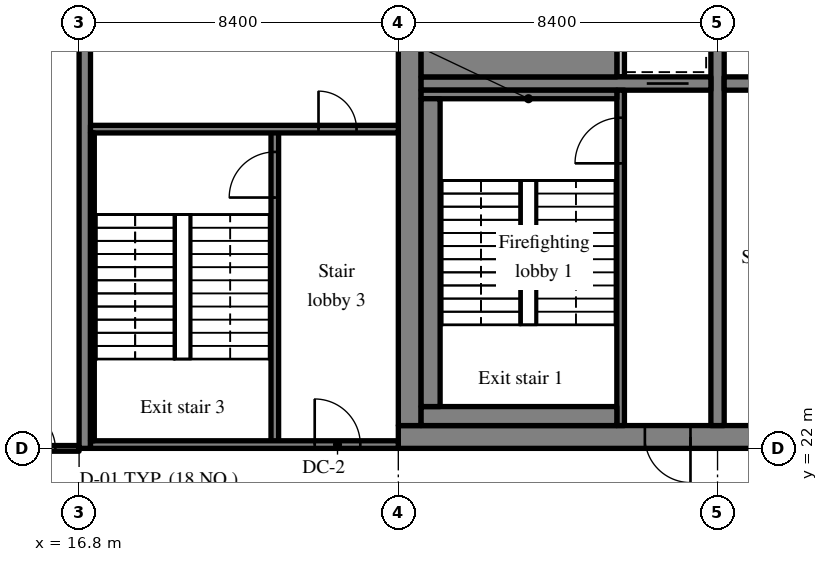
"""IFC4 building model, lengths in metres.
Left out: names, types, materials, properties, quantities, classifications, styles, units other than length and angle.
Written with IfcOpenShell. Run it as: python <this file> out.ifc"""

import sys

from ifc_helpers import new_model, si_unit, direction, frame, frame_2d, origin, place, context, subcontext, project, spatial, rectangle, extrude, source, transform, mapped, element, fill, save


model = new_model("IFC4")
c1 = context("Model", 3, precision=1e-05, world=origin(), true_north=direction((0.0, 1.0)))
c2 = subcontext(c1, "Body", "Model", "MODEL_VIEW")
j1 = project(units=[si_unit("LENGTHUNIT", "METRE"), si_unit("PLANEANGLEUNIT", "RADIAN")], contexts=[c1])
p1 = place(None, origin())
s1 = spatial("IfcSite", under=j1, at=p1, CompositionType="ELEMENT")
p2 = place(p1, origin())
s2 = spatial("IfcBuilding", under=s1, at=p2, CompositionType="ELEMENT")
p3 = place(p2, frame((0.0, 0.0, 241.3)))
s3 = spatial("IfcBuildingStorey", under=s2, at=p3, CompositionType="ELEMENT", Elevation=241.3)
m1 = source(origin(), c2, "Body", "SweptSolid", [
    extrude(rectangle(XDim=50.4, YDim=0.6, at=frame_2d((25.2, 0.0))), origin(), (0.0, 0.0, 1.0), 3.62),
])
p4 = place(p3, frame((25.2, 22.3, 0.0), z_axis=(0.0, 0.0, 1.0), x_axis=(1.0, 0.0, 0.0)))
e1 = element("IfcWall", 1, at=p4, inside=s3, PredefinedType="SHEAR", context=c2, shape_type="MappedRepresentation", body=[
    mapped(m1, transform((0.0, 0.0, 0.0), scale=1.0)),
])
m2 = source(origin(), c2, "Body", "SweptSolid", [
    extrude(rectangle(XDim=1.8, YDim=2.1, at=frame_2d((0.9, 1.05))), frame((0.0, 0.31, 0.0), z_axis=(0.0, -1.0, 0.0), x_axis=(1.0, 0.0, 0.0)), (0.0, 0.0, 1.0), 0.62),
])
p5 = place(p4, frame((15.9, 0.0, 0.0)))
e2 = element("IfcOpeningElement", 2, at=p5, cuts=e1, PredefinedType="OPENING", context=c2, shape_type="MappedRepresentation", body=[
    mapped(m2, transform((0.0, 0.0, 0.0), scale=1.0)),
])
m3 = source(origin(), c2, "Body", "SweptSolid", [
    extrude(rectangle(XDim=0.9, YDim=2.1, at=frame_2d((0.45, 1.05))), frame((0.0, 0.31, 0.0), z_axis=(0.0, -1.0, 0.0), x_axis=(1.0, 0.0, 0.0)), (0.0, 0.0, 1.0), 0.62),
])
p6 = place(p4, frame((9.687, 0.0, 0.0)))
e3 = element("IfcOpeningElement", 3, at=p6, cuts=e1, PredefinedType="OPENING", context=c2, shape_type="MappedRepresentation", body=[
    mapped(m3, transform((0.0, 0.0, 0.0), scale=1.0)),
])
p7 = place(p4, frame((21.513, 0.0, 0.0)))
e4 = element("IfcOpeningElement", 4, at=p7, cuts=e1, PredefinedType="OPENING", context=c2, shape_type="MappedRepresentation", body=[
    mapped(m3, transform((0.0, 0.0, 0.0), scale=1.0)),
])
p8 = place(p4, frame((32.7, 0.0, 0.0)))
e5 = element("IfcOpeningElement", 5, at=p8, cuts=e1, PredefinedType="OPENING", context=c2, shape_type="MappedRepresentation", body=[
    mapped(m2, transform((0.0, 0.0, 0.0), scale=1.0)),
])
m4 = source(origin(), c2, "Body", "SweptSolid", [
    extrude(rectangle(XDim=1.2, YDim=2.1, at=frame_2d((0.6, 1.05))), frame((0.0, 0.31, 0.0), z_axis=(0.0, -1.0, 0.0), x_axis=(1.0, 0.0, 0.0)), (0.0, 0.0, 1.0), 0.62),
])
p9 = place(p4, frame((6.488, 0.0, 0.0)))
e6 = element("IfcOpeningElement", 6, at=p9, cuts=e1, PredefinedType="OPENING", context=c2, shape_type="MappedRepresentation", body=[
    mapped(m4, transform((0.0, 0.0, 0.0), scale=1.0)),
])
p10 = place(p4, frame((47.925, 0.0, 0.0)))
e7 = element("IfcOpeningElement", 7, at=p10, cuts=e1, PredefinedType="OPENING", context=c2, shape_type="MappedRepresentation", body=[
    mapped(m4, transform((0.0, 0.0, 0.0), scale=1.0)),
])
m5 = source(origin(), c2, "Body", "SweptSolid", [
    extrude(rectangle(XDim=18.8, YDim=0.6, at=frame_2d((9.4, 0.0))), origin(), (0.0, 0.0, 1.0), 3.62),
])
p11 = place(p3, frame((25.5, 22.6, 0.0), z_axis=(0.0, 0.0, 1.0), x_axis=(0.0, 1.0, 0.0)))
e8 = element("IfcWall", 8, at=p11, inside=s3, PredefinedType="SHEAR", context=c2, shape_type="MappedRepresentation", body=[
    mapped(m5, transform((0.0, 0.0, 0.0), scale=1.0)),
])
m6 = source(origin(), c2, "Body", "SweptSolid", [
    extrude(rectangle(XDim=18.8, YDim=0.35, at=frame_2d((9.4, 0.0))), origin(), (0.0, 0.0, 1.0), 3.62),
])
p12 = place(p3, frame((33.6, 22.6, 0.0), z_axis=(0.0, 0.0, 1.0), x_axis=(0.0, 1.0, 0.0)))
e9 = element("IfcWall", 9, at=p12, inside=s3, PredefinedType="SHEAR", context=c2, shape_type="MappedRepresentation", body=[
    mapped(m6, transform((0.0, 0.0, 0.0), scale=1.0)),
])
m7 = source(origin(), c2, "Body", "SweptSolid", [
    extrude(rectangle(XDim=1.1, YDim=2.1, at=frame_2d((0.55, 1.05))), frame((0.0, 0.185, 0.0), z_axis=(0.0, -1.0, 0.0), x_axis=(1.0, 0.0, 0.0)), (0.0, 0.0, 1.0), 0.37),
])
p13 = place(p12, frame((12.85, 0.0, 0.0)))
e10 = element("IfcOpeningElement", 10, at=p13, cuts=e9, PredefinedType="OPENING", context=c2, shape_type="MappedRepresentation", body=[
    mapped(m7, transform((0.0, 0.0, 0.0), scale=1.0)),
])
m8 = source(origin(), c2, "Body", "SweptSolid", [
    extrude(rectangle(XDim=7.625, YDim=0.35, at=frame_2d((3.812, 0.0))), origin(), (0.0, 0.0, 1.0), 3.62),
])
p14 = place(p3, frame((25.8, 31.6, 0.0), z_axis=(0.0, 0.0, 1.0), x_axis=(1.0, 0.0, 0.0)))
e11 = element("IfcWall", 11, at=p14, inside=s3, PredefinedType="SHEAR", context=c2, shape_type="MappedRepresentation", body=[
    mapped(m8, transform((0.0, 0.0, 0.0), scale=1.0)),
])
p15 = place(p14, frame((5.938, 0.0, 0.0)))
e12 = element("IfcOpeningElement", 12, at=p15, cuts=e11, PredefinedType="OPENING", context=c2, shape_type="MappedRepresentation", body=[
    mapped(m7, transform((0.0, 0.0, 0.0), scale=1.0)),
])
m9 = source(origin(), c2, "Body", "SweptSolid", [
    extrude(rectangle(XDim=16.45, YDim=0.35, at=frame_2d((8.225, 0.0))), origin(), (0.0, 0.0, 1.0), 3.62),
])
p16 = place(p3, frame((33.775, 31.6, 0.0), z_axis=(0.0, 0.0, 1.0), x_axis=(1.0, 0.0, 0.0)))
e13 = element("IfcWall", 13, at=p16, inside=s3, PredefinedType="SHEAR", context=c2, shape_type="MappedRepresentation", body=[
    mapped(m9, transform((0.0, 0.0, 0.0), scale=1.0)),
])
m10 = source(origin(), c2, "Body", "SweptSolid", [
    extrude(rectangle(XDim=1.0, YDim=2.1, at=frame_2d((0.5, 1.05))), frame((0.0, 0.185, 0.0), z_axis=(0.0, -1.0, 0.0), x_axis=(1.0, 0.0, 0.0)), (0.0, 0.0, 1.0), 0.37),
])
p17 = place(p16, frame((14.837, 0.0, 0.0)))
e14 = element("IfcOpeningElement", 14, at=p17, cuts=e13, PredefinedType="OPENING", context=c2, shape_type="MappedRepresentation", body=[
    mapped(m10, transform((0.0, 0.0, 0.0), scale=1.0)),
])
m11 = source(origin(), c2, "Body", "SweptSolid", [
    extrude(rectangle(XDim=18.4, YDim=0.3, at=frame_2d((9.2, 0.0))), origin(), (0.0, 0.0, 1.0), 3.62),
])
p18 = place(p3, frame((16.95, 22.0, 0.0), z_axis=(0.0, 0.0, 1.0), x_axis=(0.0, 1.0, 0.0)))
e15 = element("IfcWall", 15, at=p18, inside=s3, PredefinedType="SHEAR", context=c2, shape_type="MappedRepresentation", body=[
    mapped(m11, transform((0.0, 0.0, 0.0), scale=1.0)),
])
m12 = source(origin(), c2, "Body", "SweptSolid", [
    extrude(rectangle(XDim=8.825, YDim=0.2, at=frame_2d((4.413, 0.0))), origin(), (0.0, 0.0, 1.0), 3.62),
])
p19 = place(p3, frame((31.05, 22.6, 0.0), z_axis=(0.0, 0.0, 1.0), x_axis=(0.0, 1.0, 0.0)))
e16 = element("IfcWall", 16, at=p19, inside=s3, PredefinedType="SOLIDWALL", context=c2, shape_type="MappedRepresentation", body=[
    mapped(m12, transform((0.0, 0.0, 0.0), scale=1.0)),
])
m13 = source(origin(), c2, "Body", "SweptSolid", [
    extrude(rectangle(XDim=1.2, YDim=2.1, at=frame_2d((0.6, 1.05))), frame((0.0, 0.11, 0.0), z_axis=(0.0, -1.0, 0.0), x_axis=(1.0, 0.0, 0.0)), (0.0, 0.0, 1.0), 0.22),
])
p20 = place(p19, frame((6.9, 0.0, 0.0)))
e17 = element("IfcOpeningElement", 17, at=p20, cuts=e16, PredefinedType="OPENING", context=c2, shape_type="MappedRepresentation", body=[
    mapped(m13, transform((0.0, 0.0, 0.0), scale=1.0)),
])
m14 = source(origin(), c2, "Body", "SweptSolid", [
    extrude(rectangle(XDim=1.825, YDim=0.2, at=frame_2d((0.913, 0.0))), origin(), (0.0, 0.0, 1.0), 3.62),
])
p21 = place(p3, frame((31.05, 31.775, 0.0), z_axis=(0.0, 0.0, 1.0), x_axis=(0.0, 1.0, 0.0)))
e18 = element("IfcWall", 18, at=p21, inside=s3, PredefinedType="SOLIDWALL", context=c2, shape_type="MappedRepresentation", body=[
    mapped(m14, transform((0.0, 0.0, 0.0), scale=1.0)),
])
m15 = source(origin(), c2, "Body", "SweptSolid", [
    extrude(rectangle(XDim=8.3, YDim=0.2, at=frame_2d((4.15, 0.0))), origin(), (0.0, 0.0, 1.0), 3.62),
])
p22 = place(p3, frame((21.95, 22.1, 0.0), z_axis=(0.0, 0.0, 1.0), x_axis=(0.0, 1.0, 0.0)))
e19 = element("IfcWall", 19, at=p22, inside=s3, PredefinedType="SOLIDWALL", context=c2, shape_type="MappedRepresentation", body=[
    mapped(m15, transform((0.0, 0.0, 0.0), scale=1.0)),
])
p23 = place(p22, frame((6.5, 0.0, 0.0)))
e20 = element("IfcOpeningElement", 20, at=p23, cuts=e19, PredefinedType="OPENING", context=c2, shape_type="MappedRepresentation", body=[
    mapped(m13, transform((0.0, 0.0, 0.0), scale=1.0)),
])
m16 = source(origin(), c2, "Body", "SweptSolid", [
    extrude(rectangle(XDim=8.1, YDim=0.2, at=frame_2d((4.05, 0.0))), origin(), (0.0, 0.0, 1.0), 3.62),
])
p24 = place(p3, frame((17.1, 22.1, 0.0), z_axis=(0.0, 0.0, 1.0), x_axis=(1.0, 0.0, 0.0)))
e21 = element("IfcWall", 21, at=p24, inside=s3, PredefinedType="SOLIDWALL", context=c2, shape_type="MappedRepresentation", body=[
    mapped(m16, transform((0.0, 0.0, 0.0), scale=1.0)),
])
p25 = place(p24, frame((5.9, 0.0, 0.0)))
e22 = element("IfcOpeningElement", 22, at=p25, cuts=e21, PredefinedType="OPENING", context=c2, shape_type="MappedRepresentation", body=[
    mapped(m13, transform((0.0, 0.0, 0.0), scale=1.0)),
])
p26 = place(p3, frame((17.1, 30.4, 0.0), z_axis=(0.0, 0.0, 1.0), x_axis=(1.0, 0.0, 0.0)))
e23 = element("IfcWall", 23, at=p26, inside=s3, PredefinedType="SOLIDWALL", context=c2, shape_type="MappedRepresentation", body=[
    mapped(m16, transform((0.0, 0.0, 0.0), scale=1.0)),
])
m17 = source(origin(), c2, "Body", "SweptSolid", [
    extrude(rectangle(XDim=1.0, YDim=2.1, at=frame_2d((0.5, 1.05))), frame((0.0, 0.11, 0.0), z_axis=(0.0, -1.0, 0.0), x_axis=(1.0, 0.0, 0.0)), (0.0, 0.0, 1.0), 0.22),
])
p27 = place(p26, frame((6.0, 0.0, 0.0)))
e24 = element("IfcOpeningElement", 24, at=p27, cuts=e23, PredefinedType="OPENING", context=c2, shape_type="MappedRepresentation", body=[
    mapped(m17, transform((0.0, 0.0, 0.0), scale=1.0)),
])
m18 = source(origin(), c2, "Body", "SweptSolid", [
    extrude(rectangle(XDim=5.15, YDim=0.5, at=frame_2d((2.575, 0.0))), origin(), (0.0, 0.0, 1.0), 3.62),
])
p28 = place(p3, frame((25.8, 22.85, 0.0), z_axis=(0.0, 0.0, 1.0), x_axis=(1.0, 0.0, 0.0)))
e25 = element("IfcWall", 25, at=p28, inside=s3, PredefinedType="SOLIDWALL", context=c2, shape_type="MappedRepresentation", body=[
    mapped(m18, transform((0.0, 0.0, 0.0), scale=1.0)),
])
m19 = source(origin(), c2, "Body", "SweptSolid", [
    extrude(rectangle(XDim=5.15, YDim=0.225, at=frame_2d((2.575, 0.0))), origin(), (0.0, 0.0, 1.0), 3.62),
])
p29 = place(p3, frame((25.8, 31.312, 0.0), z_axis=(0.0, 0.0, 1.0), x_axis=(1.0, 0.0, 0.0)))
e26 = element("IfcWall", 26, at=p29, inside=s3, PredefinedType="SOLIDWALL", context=c2, shape_type="MappedRepresentation", body=[
    mapped(m19, transform((0.0, 0.0, 0.0), scale=1.0)),
])
m20 = source(origin(), c2, "Body", "SweptSolid", [
    extrude(rectangle(XDim=8.1, YDim=0.5, at=frame_2d((4.05, 0.0))), origin(), (0.0, 0.0, 1.0), 3.62),
])
p30 = place(p3, frame((26.05, 23.1, 0.0), z_axis=(0.0, 0.0, 1.0), x_axis=(0.0, 1.0, 0.0)))
e27 = element("IfcWall", 27, at=p30, inside=s3, PredefinedType="SOLIDWALL", context=c2, shape_type="MappedRepresentation", body=[
    mapped(m20, transform((0.0, 0.0, 0.0), scale=1.0)),
])
m21 = source(origin(), c2, "Body", "SweptSolid", [
    extrude(rectangle(XDim=8.1, YDim=0.1, at=frame_2d((4.05, 0.0))), origin(), (0.0, 0.0, 1.0), 3.62),
])
p31 = place(p3, frame((17.15, 22.2, 0.0), z_axis=(0.0, 0.0, 1.0), x_axis=(0.0, 1.0, 0.0)))
e28 = element("IfcWall", 28, at=p31, inside=s3, PredefinedType="SOLIDWALL", context=c2, shape_type="MappedRepresentation", body=[
    mapped(m21, transform((0.0, 0.0, 0.0), scale=1.0)),
])
m22 = source(origin(), c2, "Body", "SweptSolid", [
    extrude(rectangle(XDim=5.15, YDim=1.025, at=frame_2d((2.575, 0.0))), origin(), (0.0, 0.0, 1.0), 3.62),
])
p32 = place(p3, frame((25.8, 32.287, 0.0), z_axis=(0.0, 0.0, 1.0), x_axis=(1.0, 0.0, 0.0)))
e29 = element("IfcWall", 29, at=p32, inside=s3, PredefinedType="SOLIDWALL", context=c2, shape_type="MappedRepresentation", body=[
    mapped(m22, transform((0.0, 0.0, 0.0), scale=1.0)),
])
m23 = source(origin(), c2, "Body", "SweptSolid", [
    extrude(rectangle(XDim=1.9, YDim=0.15, at=frame_2d((0.95, 0.0))), origin(), (0.0, 0.0, 1.0), 2.92),
])
p33 = place(p3, frame((14.9, 22.0, 0.0), z_axis=(0.0, 0.0, 1.0), x_axis=(1.0, 0.0, 0.0)))
e30 = element("IfcWall", 30, at=p33, inside=s3, PredefinedType="PARTITIONING", context=c2, shape_type="MappedRepresentation", body=[
    mapped(m23, transform((0.0, 0.0, 0.0), scale=1.0)),
])
m24 = source(origin(), c2, "Body", "SweptSolid", [
    extrude(rectangle(XDim=1.0, YDim=2.1, at=frame_2d((0.5, 1.05))), frame((0.0, 0.085, 0.0), z_axis=(0.0, -1.0, 0.0), x_axis=(1.0, 0.0, 0.0)), (0.0, 0.0, 1.0), 0.17),
])
p34 = place(p33, frame((0.275, 0.0, 0.0)))
e31 = element("IfcOpeningElement", 31, at=p34, cuts=e30, PredefinedType="OPENING", context=c2, shape_type="MappedRepresentation", body=[
    mapped(m24, transform((0.0, 0.0, 0.0), scale=1.0)),
])
m25 = source(origin(), c2, "Body", "SweptSolid", [
    extrude(rectangle(XDim=1.2, YDim=2.1, at=frame_2d((0.6, 1.05))), frame((0.0, 0.025, 0.0), z_axis=(0.0, -1.0, 0.0), x_axis=(1.0, 0.0, 0.0)), (0.0, 0.0, 1.0), 0.05),
])
p35 = place(p20, origin())
e32 = element("IfcDoor", 32, at=p35, inside=s3, OperationType="SINGLE_SWING_LEFT", PredefinedType="DOOR", context=c2, shape_type="MappedRepresentation", body=[
    mapped(m25, transform((0.0, 0.0, 0.0), scale=1.0)),
])
fill(e17, e32)
m26 = source(origin(), c2, "Body", "SweptSolid", [
    extrude(rectangle(XDim=1.2, YDim=2.1, at=frame_2d((0.6, 1.05))), frame((0.0, 0.225, 0.0), z_axis=(0.0, -1.0, 0.0), x_axis=(1.0, 0.0, 0.0)), (0.0, 0.0, 1.0), 0.05),
])
p36 = place(p9, origin())
e33 = element("IfcDoor", 33, at=p36, inside=s3, OperationType="SINGLE_SWING_RIGHT", PredefinedType="DOOR", context=c2, shape_type="MappedRepresentation", body=[
    mapped(m26, transform((0.0, 0.0, 0.0), scale=1.0)),
])
fill(e6, e33)
m27 = source(origin(), c2, "Body", "SweptSolid", [
    extrude(rectangle(XDim=1.1, YDim=2.1, at=frame_2d((0.55, 1.05))), frame((0.0, 0.025, 0.0), z_axis=(0.0, -1.0, 0.0), x_axis=(1.0, 0.0, 0.0)), (0.0, 0.0, 1.0), 0.05),
])
p37 = place(p15, origin())
e34 = element("IfcDoor", 34, at=p37, inside=s3, OperationType="SLIDING_TO_RIGHT", PredefinedType="DOOR", context=c2, shape_type="MappedRepresentation", body=[
    mapped(m27, transform((0.0, 0.0, 0.0), scale=1.0)),
])
fill(e12, e34)
p38 = place(p23, origin())
e35 = element("IfcDoor", 35, at=p38, inside=s3, OperationType="SINGLE_SWING_LEFT", PredefinedType="DOOR", context=c2, shape_type="MappedRepresentation", body=[
    mapped(m25, transform((0.0, 0.0, 0.0), scale=1.0)),
])
fill(e20, e35)
p39 = place(p25, origin())
e36 = element("IfcDoor", 36, at=p39, inside=s3, OperationType="SINGLE_SWING_LEFT", PredefinedType="DOOR", context=c2, shape_type="MappedRepresentation", body=[
    mapped(m25, transform((0.0, 0.0, 0.0), scale=1.0)),
])
fill(e22, e36)
m28 = source(origin(), c2, "Body", "SweptSolid", [
    extrude(rectangle(XDim=1.0, YDim=2.1, at=frame_2d((0.5, 1.05))), frame((0.0, 0.025, 0.0), z_axis=(0.0, -1.0, 0.0), x_axis=(1.0, 0.0, 0.0)), (0.0, 0.0, 1.0), 0.05),
])
p40 = place(p27, origin())
e37 = element("IfcDoor", 37, at=p40, inside=s3, OperationType="SINGLE_SWING_LEFT", PredefinedType="DOOR", context=c2, shape_type="MappedRepresentation", body=[
    mapped(m28, transform((0.0, 0.0, 0.0), scale=1.0)),
])
fill(e24, e37)
p41 = place(p34, origin())
e38 = element("IfcDoor", 38, at=p41, inside=s3, OperationType="SINGLE_SWING_LEFT", PredefinedType="DOOR", context=c2, shape_type="MappedRepresentation", body=[
    mapped(m28, transform((0.0, 0.0, 0.0), scale=1.0)),
])
fill(e31, e38)
save(model, sys.argv[1])
